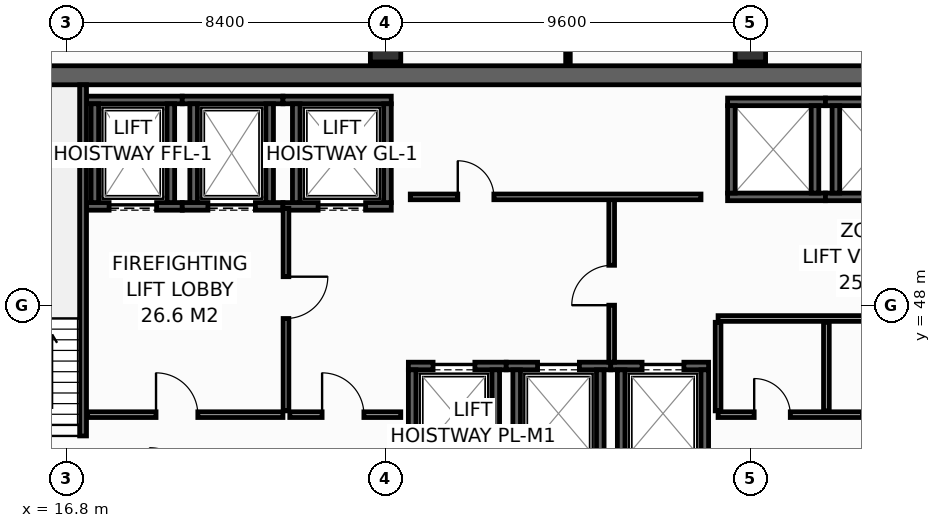
"""IFC4 building model, lengths in metres.
Left out: names, types, materials, properties, quantities, classifications, styles, units other than length and angle.
Written with IfcOpenShell. Run it as: python <this file> out.ifc"""

import sys

from ifc_helpers import new_model, si_unit, direction, frame, frame_2d, origin, origin_2d, place, context, subcontext, project, spatial, rectangle, hollow_rectangle, extrude, element, fill, save


model = new_model("IFC4")
c1 = context("Model", 3, precision=1e-05, world=origin(), true_north=direction((0.0, 1.0)))
c2 = subcontext(c1, "Body", "Model", "MODEL_VIEW")
j1 = project(units=[si_unit("LENGTHUNIT", "METRE"), si_unit("PLANEANGLEUNIT", "RADIAN")], contexts=[c1])
p1 = place(None, origin())
s1 = spatial("IfcSite", under=j1, at=p1, CompositionType="ELEMENT")
p2 = place(p1, origin())
s2 = spatial("IfcBuilding", under=s1, at=p2, CompositionType="ELEMENT")
p3 = place(p2, frame((0.0, 0.0, 205.6)))
s3 = spatial("IfcBuildingStorey", under=s2, at=p3, CompositionType="ELEMENT", Elevation=205.6)
p4 = place(p3, frame((13.6, 54.05, 0.0), z_axis=(0.0, 0.0, 1.0), x_axis=(1.0, 0.0, 0.0)))
e1 = element("IfcWall", 1, at=p4, inside=s3, PredefinedType="SHEAR", context=c2, shape_type="SweptSolid", body=[
    extrude(rectangle(XDim=32.7, YDim=0.5, at=frame_2d((16.35, 0.0))), origin(), (0.0, 0.0, 1.0), 3.55),
])
for number, where, z_axis, x_axis in (
    (2, (25.2, 54.8, 0.0), (0.0, 0.0, 1.0), (1.0, 0.0, 0.0)),
    (3, (34.8, 54.8, 0.0), (0.0, 0.0, 1.0), (1.0, 0.0, 0.0)),
):
    element("IfcColumn", number, at=place(p3, frame(where, z_axis=z_axis, x_axis=x_axis)), inside=s3, PredefinedType="COLUMN", context=c2, shape_type="SweptSolid", body=[
        extrude(hollow_rectangle(XDim=0.8, YDim=0.8, WallThickness=0.036, at=origin_2d()), origin(), (0.0, 0.0, 1.0), 3.8),
    ])
p5 = place(p3, frame((17.33, 50.6, 0.0), z_axis=(0.0, 0.0, 1.0), x_axis=(1.0, 0.0, 0.0)))
e4 = element("IfcWall", 4, at=p5, inside=s3, PredefinedType="SHEAR", context=c2, shape_type="SweptSolid", body=[
    extrude(rectangle(XDim=2.52, YDim=0.2, at=frame_2d((1.26, 0.0))), origin(), (0.0, 0.0, 1.0), 3.55),
])
p6 = place(p5, frame((0.595, 0.0, 0.0)))
e5 = element("IfcOpeningElement", 5, at=p6, cuts=e4, PredefinedType="OPENING", context=c2, shape_type="SweptSolid", body=[
    extrude(rectangle(XDim=1.25, YDim=2.3, at=frame_2d((0.625, 1.15))), frame((0.0, 0.11, 0.0), z_axis=(0.0, -1.0, 0.0), x_axis=(1.0, 0.0, 0.0)), (0.0, 0.0, 1.0), 0.22),
])
p7 = place(p3, frame((17.33, 53.4, 0.0), z_axis=(0.0, 0.0, 1.0), x_axis=(1.0, 0.0, 0.0)))
e6 = element("IfcWall", 6, at=p7, inside=s3, PredefinedType="SHEAR", context=c2, shape_type="SweptSolid", body=[
    extrude(rectangle(XDim=2.52, YDim=0.2, at=frame_2d((1.26, 0.0))), origin(), (0.0, 0.0, 1.0), 3.55),
])
for number, where, z_axis, x_axis in (
    (7, (17.55, 50.7, 0.0), (0.0, 0.0, 1.0), (0.0, 1.0, 0.0)),
    (8, (19.55, 50.7, 0.0), (0.0, 0.0, 1.0), (0.0, 1.0, 0.0)),
):
    element("IfcWall", number, at=place(p3, frame(where, z_axis=z_axis, x_axis=x_axis)), inside=s3, PredefinedType="SHEAR", context=c2, shape_type="SweptSolid", body=[
        extrude(rectangle(XDim=2.6, YDim=0.2, at=frame_2d((1.3, 0.0))), origin(), (0.0, 0.0, 1.0), 3.55),
    ])
p8 = place(p3, frame((19.85, 50.6, 0.0), z_axis=(0.0, 0.0, 1.0), x_axis=(1.0, 0.0, 0.0)))
e9 = element("IfcWall", 9, at=p8, inside=s3, PredefinedType="SHEAR", context=c2, shape_type="SweptSolid", body=[
    extrude(rectangle(XDim=2.65, YDim=0.2, at=frame_2d((1.325, 0.0))), origin(), (0.0, 0.0, 1.0), 3.55),
])
p9 = place(p8, frame((0.675, 0.0, 0.0)))
e10 = element("IfcOpeningElement", 10, at=p9, cuts=e9, PredefinedType="OPENING", context=c2, shape_type="SweptSolid", body=[
    extrude(rectangle(XDim=1.25, YDim=2.3, at=frame_2d((0.625, 1.15))), frame((0.0, 0.11, 0.0), z_axis=(0.0, -1.0, 0.0), x_axis=(1.0, 0.0, 0.0)), (0.0, 0.0, 1.0), 0.22),
])
p10 = place(p3, frame((19.85, 53.4, 0.0), z_axis=(0.0, 0.0, 1.0), x_axis=(1.0, 0.0, 0.0)))
e11 = element("IfcWall", 11, at=p10, inside=s3, PredefinedType="SHEAR", context=c2, shape_type="SweptSolid", body=[
    extrude(rectangle(XDim=2.65, YDim=0.2, at=frame_2d((1.325, 0.0))), origin(), (0.0, 0.0, 1.0), 3.55),
])
for number, where, z_axis, x_axis in (
    (12, (20.15, 50.7, 0.0), (0.0, 0.0, 1.0), (0.0, 1.0, 0.0)),
    (13, (22.15, 50.7, 0.0), (0.0, 0.0, 1.0), (0.0, 1.0, 0.0)),
):
    element("IfcWall", number, at=place(p3, frame(where, z_axis=z_axis, x_axis=x_axis)), inside=s3, PredefinedType="SHEAR", context=c2, shape_type="SweptSolid", body=[
        extrude(rectangle(XDim=2.6, YDim=0.2, at=frame_2d((1.3, 0.0))), origin(), (0.0, 0.0, 1.0), 3.55),
    ])
p11 = place(p3, frame((22.5, 50.6, 0.0), z_axis=(0.0, 0.0, 1.0), x_axis=(1.0, 0.0, 0.0)))
e14 = element("IfcWall", 14, at=p11, inside=s3, PredefinedType="SHEAR", context=c2, shape_type="SweptSolid", body=[
    extrude(rectangle(XDim=2.85, YDim=0.2, at=frame_2d((1.425, 0.0))), origin(), (0.0, 0.0, 1.0), 3.55),
])
p12 = place(p11, frame((0.925, 0.0, 0.0)))
e15 = element("IfcOpeningElement", 15, at=p12, cuts=e14, PredefinedType="OPENING", context=c2, shape_type="SweptSolid", body=[
    extrude(rectangle(XDim=1.25, YDim=2.3, at=frame_2d((0.625, 1.15))), frame((0.0, 0.11, 0.0), z_axis=(0.0, -1.0, 0.0), x_axis=(1.0, 0.0, 0.0)), (0.0, 0.0, 1.0), 0.22),
])
p13 = place(p3, frame((22.5, 53.4, 0.0), z_axis=(0.0, 0.0, 1.0), x_axis=(1.0, 0.0, 0.0)))
e16 = element("IfcWall", 16, at=p13, inside=s3, PredefinedType="SHEAR", context=c2, shape_type="SweptSolid", body=[
    extrude(rectangle(XDim=2.85, YDim=0.2, at=frame_2d((1.425, 0.0))), origin(), (0.0, 0.0, 1.0), 3.55),
])
for number, where, z_axis, x_axis in (
    (17, (22.85, 50.7, 0.0), (0.0, 0.0, 1.0), (0.0, 1.0, 0.0)),
    (18, (25.25, 50.7, 0.0), (0.0, 0.0, 1.0), (0.0, 1.0, 0.0)),
):
    element("IfcWall", number, at=place(p3, frame(where, z_axis=z_axis, x_axis=x_axis)), inside=s3, PredefinedType="SHEAR", context=c2, shape_type="SweptSolid", body=[
        extrude(rectangle(XDim=2.6, YDim=0.2, at=frame_2d((1.3, 0.0))), origin(), (0.0, 0.0, 1.0), 3.55),
    ])
p14 = place(p3, frame((25.8, 46.4, 0.0), z_axis=(0.0, 0.0, 1.0), x_axis=(1.0, 0.0, 0.0)))
e19 = element("IfcWall", 19, at=p14, inside=s3, PredefinedType="SHEAR", context=c2, shape_type="SweptSolid", body=[
    extrude(rectangle(XDim=2.575, YDim=0.2, at=frame_2d((1.288, 0.0))), origin(), (0.0, 0.0, 1.0), 3.55),
])
p15 = place(p14, frame((0.65, 0.0, 0.0)))
e20 = element("IfcOpeningElement", 20, at=p15, cuts=e19, PredefinedType="OPENING", context=c2, shape_type="SweptSolid", body=[
    extrude(rectangle(XDim=1.1, YDim=2.2, at=frame_2d((0.55, 1.1))), frame((0.0, 0.11, 0.0), z_axis=(0.0, -1.0, 0.0), x_axis=(1.0, 0.0, 0.0)), (0.0, 0.0, 1.0), 0.22),
])
for number, where, z_axis, x_axis in (
    (21, (25.9, 44.0, 0.0), (0.0, 0.0, 1.0), (0.0, 1.0, 0.0)),
    (22, (28.1, 44.0, 0.0), (0.0, 0.0, 1.0), (0.0, 1.0, 0.0)),
):
    element("IfcWall", number, at=place(p3, frame(where, z_axis=z_axis, x_axis=x_axis)), inside=s3, PredefinedType="SHEAR", context=c2, shape_type="SweptSolid", body=[
        extrude(rectangle(XDim=2.3, YDim=0.2, at=frame_2d((1.15, 0.0))), origin(), (0.0, 0.0, 1.0), 3.55),
    ])
p16 = place(p3, frame((28.375, 46.4, 0.0), z_axis=(0.0, 0.0, 1.0), x_axis=(1.0, 0.0, 0.0)))
e23 = element("IfcWall", 23, at=p16, inside=s3, PredefinedType="SHEAR", context=c2, shape_type="SweptSolid", body=[
    extrude(rectangle(XDim=2.75, YDim=0.2, at=frame_2d((1.375, 0.0))), origin(), (0.0, 0.0, 1.0), 3.55),
])
p17 = place(p16, frame((0.825, 0.0, 0.0)))
e24 = element("IfcOpeningElement", 24, at=p17, cuts=e23, PredefinedType="OPENING", context=c2, shape_type="SweptSolid", body=[
    extrude(rectangle(XDim=1.1, YDim=2.2, at=frame_2d((0.55, 1.1))), frame((0.0, 0.11, 0.0), z_axis=(0.0, -1.0, 0.0), x_axis=(1.0, 0.0, 0.0)), (0.0, 0.0, 1.0), 0.22),
])
for number, where, z_axis, x_axis in (
    (25, (28.65, 44.0, 0.0), (0.0, 0.0, 1.0), (0.0, 1.0, 0.0)),
    (26, (30.85, 44.0, 0.0), (0.0, 0.0, 1.0), (0.0, 1.0, 0.0)),
):
    element("IfcWall", number, at=place(p3, frame(where, z_axis=z_axis, x_axis=x_axis)), inside=s3, PredefinedType="SHEAR", context=c2, shape_type="SweptSolid", body=[
        extrude(rectangle(XDim=2.3, YDim=0.2, at=frame_2d((1.15, 0.0))), origin(), (0.0, 0.0, 1.0), 3.55),
    ])
p18 = place(p3, frame((31.125, 46.4, 0.0), z_axis=(0.0, 0.0, 1.0), x_axis=(1.0, 0.0, 0.0)))
e27 = element("IfcWall", 27, at=p18, inside=s3, PredefinedType="SHEAR", context=c2, shape_type="SweptSolid", body=[
    extrude(rectangle(XDim=2.575, YDim=0.2, at=frame_2d((1.288, 0.0))), origin(), (0.0, 0.0, 1.0), 3.55),
])
p19 = place(p18, frame((0.825, 0.0, 0.0)))
e28 = element("IfcOpeningElement", 28, at=p19, cuts=e27, PredefinedType="OPENING", context=c2, shape_type="SweptSolid", body=[
    extrude(rectangle(XDim=1.1, YDim=2.2, at=frame_2d((0.55, 1.1))), frame((0.0, 0.11, 0.0), z_axis=(0.0, -1.0, 0.0), x_axis=(1.0, 0.0, 0.0)), (0.0, 0.0, 1.0), 0.22),
])
for number, where, z_axis, x_axis in (
    (29, (31.4, 44.0, 0.0), (0.0, 0.0, 1.0), (0.0, 1.0, 0.0)),
    (30, (33.6, 44.0, 0.0), (0.0, 0.0, 1.0), (0.0, 1.0, 0.0)),
):
    element("IfcWall", number, at=place(p3, frame(where, z_axis=z_axis, x_axis=x_axis)), inside=s3, PredefinedType="SHEAR", context=c2, shape_type="SweptSolid", body=[
        extrude(rectangle(XDim=2.3, YDim=0.2, at=frame_2d((1.15, 0.0))), origin(), (0.0, 0.0, 1.0), 3.55),
    ])
for number, where, z_axis, x_axis in (
    (31, (34.2, 50.85, 0.0), (0.0, 0.0, 1.0), (1.0, 0.0, 0.0)),
    (32, (34.2, 53.35, 0.0), (0.0, 0.0, 1.0), (1.0, 0.0, 0.0)),
):
    element("IfcWall", number, at=place(p3, frame(where, z_axis=z_axis, x_axis=x_axis)), inside=s3, PredefinedType="SHEAR", context=c2, shape_type="SweptSolid", body=[
        extrude(rectangle(XDim=2.575, YDim=0.2, at=frame_2d((1.288, 0.0))), origin(), (0.0, 0.0, 1.0), 3.55),
    ])
for number, where, z_axis, x_axis in (
    (33, (34.3, 50.95, 0.0), (0.0, 0.0, 1.0), (0.0, 1.0, 0.0)),
    (34, (36.5, 50.95, 0.0), (0.0, 0.0, 1.0), (0.0, 1.0, 0.0)),
):
    element("IfcWall", number, at=place(p3, frame(where, z_axis=z_axis, x_axis=x_axis)), inside=s3, PredefinedType="SHEAR", context=c2, shape_type="SweptSolid", body=[
        extrude(rectangle(XDim=2.3, YDim=0.2, at=frame_2d((1.15, 0.0))), origin(), (0.0, 0.0, 1.0), 3.55),
    ])
for number, where, z_axis, x_axis in (
    (35, (36.775, 50.85, 0.0), (0.0, 0.0, 1.0), (1.0, 0.0, 0.0)),
    (36, (36.775, 53.35, 0.0), (0.0, 0.0, 1.0), (1.0, 0.0, 0.0)),
):
    element("IfcWall", number, at=place(p3, frame(where, z_axis=z_axis, x_axis=x_axis)), inside=s3, PredefinedType="SHEAR", context=c2, shape_type="SweptSolid", body=[
        extrude(rectangle(XDim=2.75, YDim=0.2, at=frame_2d((1.375, 0.0))), origin(), (0.0, 0.0, 1.0), 3.55),
    ])
p20 = place(p3, frame((37.05, 50.95, 0.0), z_axis=(0.0, 0.0, 1.0), x_axis=(0.0, 1.0, 0.0)))
e37 = element("IfcWall", 37, at=p20, inside=s3, PredefinedType="SHEAR", context=c2, shape_type="SweptSolid", body=[
    extrude(rectangle(XDim=2.3, YDim=0.2, at=frame_2d((1.15, 0.0))), origin(), (0.0, 0.0, 1.0), 3.55),
])
p21 = place(p3, frame((17.24, 43.4, 0.0), z_axis=(0.0, 0.0, 1.0), x_axis=(0.0, 1.0, 0.0)))
e38 = element("IfcWall", 38, at=p21, inside=s3, PredefinedType="SHEAR", context=c2, shape_type="SweptSolid", body=[
    extrude(rectangle(XDim=10.4, YDim=0.18, at=frame_2d((5.2, 0.0))), origin(), (0.0, 0.0, 1.0), 3.55),
])
p22 = place(p21, frame((0.16, 0.0, 0.0)))
e39 = element("IfcOpeningElement", 39, at=p22, cuts=e38, PredefinedType="OPENING", context=c2, shape_type="SweptSolid", body=[
    extrude(rectangle(XDim=1.0, YDim=2.15, at=frame_2d((0.5, 1.075))), frame((0.0, 0.1, 0.0), z_axis=(0.0, -1.0, 0.0), x_axis=(1.0, 0.0, 0.0)), (0.0, 0.0, 1.0), 0.2),
])
p23 = place(p3, frame((17.36, 45.12, 0.0), z_axis=(0.0, 0.0, 1.0), x_axis=(1.0, 0.0, 0.0)))
e40 = element("IfcWall", 40, at=p23, inside=s3, PredefinedType="PARTITIONING", context=c2, shape_type="SweptSolid", body=[
    extrude(rectangle(XDim=5.14, YDim=0.15, at=frame_2d((2.57, 0.0))), origin(), (0.0, 0.0, 1.0), 3.55),
])
p24 = place(p23, frame((1.8, 0.0, 0.0)))
e41 = element("IfcOpeningElement", 41, at=p24, cuts=e40, PredefinedType="OPENING", context=c2, shape_type="SweptSolid", body=[
    extrude(rectangle(XDim=1.1, YDim=2.15, at=frame_2d((0.55, 1.075))), frame((0.0, 0.085, 0.0), z_axis=(0.0, -1.0, 0.0), x_axis=(1.0, 0.0, 0.0)), (0.0, 0.0, 1.0), 0.17),
])
p25 = place(p3, frame((22.58, 50.55, 0.0), z_axis=(0.0, 0.0, 1.0), x_axis=(0.0, -1.0, 0.0)))
e42 = element("IfcWall", 42, at=p25, inside=s3, PredefinedType="PARTITIONING", context=c2, shape_type="SweptSolid", body=[
    extrude(rectangle(XDim=5.33, YDim=0.15, at=frame_2d((2.665, 0.0))), origin(), (0.0, 0.0, 1.0), 3.55),
])
p26 = place(p25, frame((1.8, 0.0, 0.0)))
e43 = element("IfcOpeningElement", 43, at=p26, cuts=e42, PredefinedType="OPENING", context=c2, shape_type="SweptSolid", body=[
    extrude(rectangle(XDim=1.1, YDim=2.15, at=frame_2d((0.55, 1.075))), frame((0.0, 0.085, 0.0), z_axis=(0.0, -1.0, 0.0), x_axis=(1.0, 0.0, 0.0)), (0.0, 0.0, 1.0), 0.17),
])
p27 = place(p3, frame((22.68, 45.12, 0.0), z_axis=(0.0, 0.0, 1.0), x_axis=(1.0, 0.0, 0.0)))
e44 = element("IfcWall", 44, at=p27, inside=s3, PredefinedType="PARTITIONING", context=c2, shape_type="SweptSolid", body=[
    extrude(rectangle(XDim=2.92, YDim=0.15, at=frame_2d((1.46, 0.0))), origin(), (0.0, 0.0, 1.0), 3.55),
])
p28 = place(p27, frame((0.85, 0.0, 0.0)))
e45 = element("IfcOpeningElement", 45, at=p28, cuts=e44, PredefinedType="OPENING", context=c2, shape_type="SweptSolid", body=[
    extrude(rectangle(XDim=1.1, YDim=2.15, at=frame_2d((0.55, 1.075))), frame((0.0, 0.085, 0.0), z_axis=(0.0, -1.0, 0.0), x_axis=(1.0, 0.0, 0.0)), (0.0, 0.0, 1.0), 0.17),
])
p29 = place(p3, frame((31.15, 46.5, 0.0), z_axis=(0.0, 0.0, 1.0), x_axis=(0.0, 1.0, 0.0)))
e46 = element("IfcWall", 46, at=p29, inside=s3, PredefinedType="PARTITIONING", context=c2, shape_type="SweptSolid", body=[
    extrude(rectangle(XDim=4.35, YDim=0.15, at=frame_2d((2.175, 0.0))), origin(), (0.0, 0.0, 1.0), 3.55),
])
p30 = place(p29, frame((1.5, 0.0, 0.0)))
e47 = element("IfcOpeningElement", 47, at=p30, cuts=e46, PredefinedType="OPENING", context=c2, shape_type="SweptSolid", body=[
    extrude(rectangle(XDim=1.05, YDim=2.15, at=frame_2d((0.525, 1.075))), frame((0.0, 0.085, 0.0), z_axis=(0.0, -1.0, 0.0), x_axis=(1.0, 0.0, 0.0)), (0.0, 0.0, 1.0), 0.17),
])
p31 = place(p3, frame((33.95, 45.12, 0.0), z_axis=(0.0, 0.0, 1.0), x_axis=(1.0, 0.0, 0.0)))
e48 = element("IfcWall", 48, at=p31, inside=s3, PredefinedType="PARTITIONING", context=c2, shape_type="SweptSolid", body=[
    extrude(rectangle(XDim=8.55, YDim=0.15, at=frame_2d((4.275, 0.0))), origin(), (0.0, 0.0, 1.0), 3.55),
])
p32 = place(p31, frame((0.95, 0.0, 0.0)))
e49 = element("IfcOpeningElement", 49, at=p32, cuts=e48, PredefinedType="OPENING", context=c2, shape_type="SweptSolid", body=[
    extrude(rectangle(XDim=0.95, YDim=2.15, at=frame_2d((0.475, 1.075))), frame((0.0, 0.085, 0.0), z_axis=(0.0, -1.0, 0.0), x_axis=(1.0, 0.0, 0.0)), (0.0, 0.0, 1.0), 0.17),
])
p33 = place(p31, frame((3.8, 0.0, 0.0)))
e50 = element("IfcOpeningElement", 50, at=p33, cuts=e48, PredefinedType="OPENING", context=c2, shape_type="SweptSolid", body=[
    extrude(rectangle(XDim=0.95, YDim=2.15, at=frame_2d((0.475, 1.075))), frame((0.0, 0.085, 0.0), z_axis=(0.0, -1.0, 0.0), x_axis=(1.0, 0.0, 0.0)), (0.0, 0.0, 1.0), 0.17),
])
p34 = place(p31, frame((6.65, 0.0, 0.0)))
e51 = element("IfcOpeningElement", 51, at=p34, cuts=e48, PredefinedType="OPENING", context=c2, shape_type="SweptSolid", body=[
    extrude(rectangle(XDim=0.95, YDim=2.15, at=frame_2d((0.475, 1.075))), frame((0.0, 0.085, 0.0), z_axis=(0.0, -1.0, 0.0), x_axis=(1.0, 0.0, 0.0)), (0.0, 0.0, 1.0), 0.17),
])
p35 = place(p3, frame((33.95, 47.65, 0.0), z_axis=(0.0, 0.0, 1.0), x_axis=(1.0, 0.0, 0.0)))
e52 = element("IfcWall", 52, at=p35, inside=s3, PredefinedType="PARTITIONING", context=c2, shape_type="SweptSolid", body=[
    extrude(rectangle(XDim=8.55, YDim=0.15, at=frame_2d((4.275, 0.0))), origin(), (0.0, 0.0, 1.0), 3.55),
])
for number, where, z_axis, x_axis in (
    (53, (33.95, 45.22, 0.0), (0.0, 0.0, 1.0), (0.0, 1.0, 0.0)),
    (54, (36.8, 45.22, 0.0), (0.0, 0.0, 1.0), (0.0, 1.0, 0.0)),
):
    element("IfcWall", number, at=place(p3, frame(where, z_axis=z_axis, x_axis=x_axis)), inside=s3, PredefinedType="PARTITIONING", context=c2, shape_type="SweptSolid", body=[
        extrude(rectangle(XDim=2.33, YDim=0.15, at=frame_2d((1.165, 0.0))), origin(), (0.0, 0.0, 1.0), 3.55),
    ])
p36 = place(p3, frame((25.85, 50.85, 0.0), z_axis=(0.0, 0.0, 1.0), x_axis=(1.0, 0.0, 0.0)))
e55 = element("IfcWall", 55, at=p36, inside=s3, PredefinedType="PARTITIONING", context=c2, shape_type="SweptSolid", body=[
    extrude(rectangle(XDim=7.65, YDim=0.15, at=frame_2d((3.825, 0.0))), origin(), (0.0, 0.0, 1.0), 3.55),
])
p37 = place(p36, frame((1.25, 0.0, 0.0)))
e56 = element("IfcOpeningElement", 56, at=p37, cuts=e55, PredefinedType="OPENING", context=c2, shape_type="SweptSolid", body=[
    extrude(rectangle(XDim=0.95, YDim=2.15, at=frame_2d((0.475, 1.075))), frame((0.0, 0.085, 0.0), z_axis=(0.0, -1.0, 0.0), x_axis=(1.0, 0.0, 0.0)), (0.0, 0.0, 1.0), 0.17),
])
p38 = place(p3, frame((30.0, 54.32, 0.0), z_axis=(0.0, 0.0, 1.0), x_axis=(0.0, 1.0, 0.0)))
e57 = element("IfcWall", 57, at=p38, inside=s3, PredefinedType="PARTITIONING", context=c2, shape_type="SweptSolid", body=[
    extrude(rectangle(XDim=1.675, YDim=0.12, at=frame_2d((0.837, 0.0))), origin(), (0.0, 0.0, 1.0), 2.935),
])
p39 = place(p6, origin())
e58 = element("IfcDoor", 58, at=p39, inside=s3, OperationType="SLIDING_TO_LEFT", PredefinedType="DOOR", context=c2, shape_type="SweptSolid", body=[
    extrude(rectangle(XDim=1.25, YDim=2.3, at=frame_2d((0.625, 1.15))), frame((0.0, 0.025, 0.0), z_axis=(0.0, -1.0, 0.0), x_axis=(1.0, 0.0, 0.0)), (0.0, 0.0, 1.0), 0.05),
])
fill(e5, e58)
p40 = place(p9, origin())
e59 = element("IfcDoor", 59, at=p40, inside=s3, OperationType="SLIDING_TO_LEFT", PredefinedType="DOOR", context=c2, shape_type="SweptSolid", body=[
    extrude(rectangle(XDim=1.25, YDim=2.3, at=frame_2d((0.625, 1.15))), frame((0.0, 0.025, 0.0), z_axis=(0.0, -1.0, 0.0), x_axis=(1.0, 0.0, 0.0)), (0.0, 0.0, 1.0), 0.05),
])
fill(e10, e59)
p41 = place(p12, origin())
e60 = element("IfcDoor", 60, at=p41, inside=s3, OperationType="SLIDING_TO_LEFT", PredefinedType="DOOR", context=c2, shape_type="SweptSolid", body=[
    extrude(rectangle(XDim=1.25, YDim=2.3, at=frame_2d((0.625, 1.15))), frame((0.0, 0.025, 0.0), z_axis=(0.0, -1.0, 0.0), x_axis=(1.0, 0.0, 0.0)), (0.0, 0.0, 1.0), 0.05),
])
fill(e15, e60)
p42 = place(p15, origin())
e61 = element("IfcDoor", 61, at=p42, inside=s3, OperationType="SLIDING_TO_LEFT", PredefinedType="DOOR", context=c2, shape_type="SweptSolid", body=[
    extrude(rectangle(XDim=1.1, YDim=2.2, at=frame_2d((0.55, 1.1))), frame((0.0, 0.025, 0.0), z_axis=(0.0, -1.0, 0.0), x_axis=(1.0, 0.0, 0.0)), (0.0, 0.0, 1.0), 0.05),
])
fill(e20, e61)
p43 = place(p17, origin())
e62 = element("IfcDoor", 62, at=p43, inside=s3, OperationType="SLIDING_TO_LEFT", PredefinedType="DOOR", context=c2, shape_type="SweptSolid", body=[
    extrude(rectangle(XDim=1.1, YDim=2.2, at=frame_2d((0.55, 1.1))), frame((0.0, 0.025, 0.0), z_axis=(0.0, -1.0, 0.0), x_axis=(1.0, 0.0, 0.0)), (0.0, 0.0, 1.0), 0.05),
])
fill(e24, e62)
p44 = place(p19, origin())
e63 = element("IfcDoor", 63, at=p44, inside=s3, OperationType="SLIDING_TO_LEFT", PredefinedType="DOOR", context=c2, shape_type="SweptSolid", body=[
    extrude(rectangle(XDim=1.1, YDim=2.2, at=frame_2d((0.55, 1.1))), frame((0.0, 0.025, 0.0), z_axis=(0.0, -1.0, 0.0), x_axis=(1.0, 0.0, 0.0)), (0.0, 0.0, 1.0), 0.05),
])
fill(e28, e63)
p45 = place(p22, origin())
e64 = element("IfcDoor", 64, at=p45, inside=s3, OperationType="SINGLE_SWING_RIGHT", PredefinedType="DOOR", context=c2, shape_type="SweptSolid", body=[
    extrude(rectangle(XDim=1.0, YDim=2.15, at=frame_2d((0.5, 1.075))), frame((0.0, 0.025, 0.0), z_axis=(0.0, -1.0, 0.0), x_axis=(1.0, 0.0, 0.0)), (0.0, 0.0, 1.0), 0.05),
])
fill(e39, e64)
p46 = place(p24, origin())
e65 = element("IfcDoor", 65, at=p46, inside=s3, OperationType="SINGLE_SWING_LEFT", PredefinedType="DOOR", context=c2, shape_type="SweptSolid", body=[
    extrude(rectangle(XDim=1.1, YDim=2.15, at=frame_2d((0.55, 1.075))), frame((0.0, 0.025, 0.0), z_axis=(0.0, -1.0, 0.0), x_axis=(1.0, 0.0, 0.0)), (0.0, 0.0, 1.0), 0.05),
])
fill(e41, e65)
p47 = place(p26, origin())
e66 = element("IfcDoor", 66, at=p47, inside=s3, OperationType="SINGLE_SWING_LEFT", PredefinedType="DOOR", context=c2, shape_type="SweptSolid", body=[
    extrude(rectangle(XDim=1.1, YDim=2.15, at=frame_2d((0.55, 1.075))), frame((0.0, 0.025, 0.0), z_axis=(0.0, -1.0, 0.0), x_axis=(1.0, 0.0, 0.0)), (0.0, 0.0, 1.0), 0.05),
])
fill(e43, e66)
p48 = place(p28, origin())
e67 = element("IfcDoor", 67, at=p48, inside=s3, OperationType="SINGLE_SWING_LEFT", PredefinedType="DOOR", context=c2, shape_type="SweptSolid", body=[
    extrude(rectangle(XDim=1.1, YDim=2.15, at=frame_2d((0.55, 1.075))), frame((0.0, 0.025, 0.0), z_axis=(0.0, -1.0, 0.0), x_axis=(1.0, 0.0, 0.0)), (0.0, 0.0, 1.0), 0.05),
])
fill(e45, e67)
p49 = place(p30, origin())
e68 = element("IfcDoor", 68, at=p49, inside=s3, OperationType="SINGLE_SWING_LEFT", PredefinedType="DOOR", context=c2, shape_type="SweptSolid", body=[
    extrude(rectangle(XDim=1.05, YDim=2.15, at=frame_2d((0.525, 1.075))), frame((0.0, 0.025, 0.0), z_axis=(0.0, -1.0, 0.0), x_axis=(1.0, 0.0, 0.0)), (0.0, 0.0, 1.0), 0.05),
])
fill(e47, e68)
p50 = place(p32, origin())
e69 = element("IfcDoor", 69, at=p50, inside=s3, OperationType="SINGLE_SWING_LEFT", PredefinedType="DOOR", context=c2, shape_type="SweptSolid", body=[
    extrude(rectangle(XDim=0.95, YDim=2.15, at=frame_2d((0.475, 1.075))), frame((0.0, 0.025, 0.0), z_axis=(0.0, -1.0, 0.0), x_axis=(1.0, 0.0, 0.0)), (0.0, 0.0, 1.0), 0.05),
])
fill(e49, e69)
p51 = place(p37, origin())
e70 = element("IfcDoor", 70, at=p51, inside=s3, OperationType="SINGLE_SWING_LEFT", PredefinedType="DOOR", context=c2, shape_type="SweptSolid", body=[
    extrude(rectangle(XDim=0.95, YDim=2.15, at=frame_2d((0.475, 1.075))), frame((0.0, 0.025, 0.0), z_axis=(0.0, -1.0, 0.0), x_axis=(1.0, 0.0, 0.0)), (0.0, 0.0, 1.0), 0.05),
])
fill(e56, e70)
save(model, sys.argv[1])
